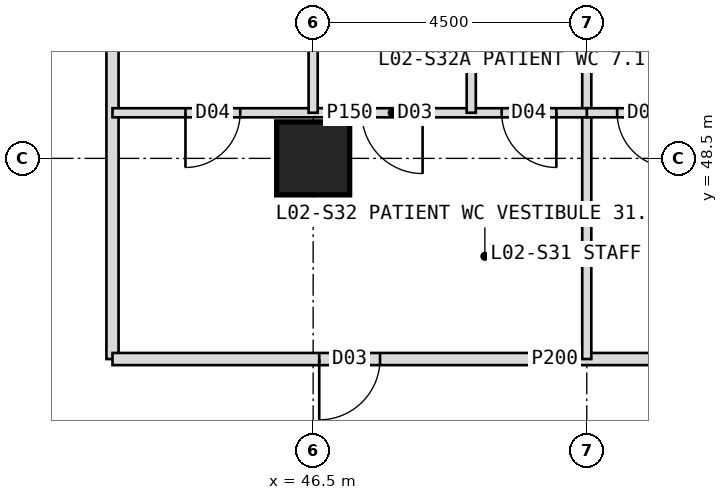
"""IFC4 building model, lengths in metres.
Left out: names, types, materials, properties, quantities, classifications, styles, units other than length and angle.
Written with IfcOpenShell. Run it as: python <this file> out.ifc"""

import sys

from ifc_helpers import new_model, si_unit, direction, frame, frame_2d, origin, origin_2d, place, context, subcontext, project, spatial, rectangle, hollow_rectangle, extrude, element, fill, save


model = new_model("IFC4")
c1 = context("Model", 3, precision=1e-05, world=origin(), true_north=direction((0.0, 1.0)))
c2 = subcontext(c1, "Body", "Model", "MODEL_VIEW")
j1 = project(units=[si_unit("LENGTHUNIT", "METRE"), si_unit("PLANEANGLEUNIT", "RADIAN")], contexts=[c1])
p1 = place(None, origin())
s1 = spatial("IfcSite", under=j1, at=p1, CompositionType="ELEMENT")
p2 = place(p1, origin())
s2 = spatial("IfcBuilding", under=s1, at=p2, CompositionType="ELEMENT")
p3 = place(p2, frame((0.0, 0.0, 11.0)))
s3 = spatial("IfcBuildingStorey", under=s2, at=p3, CompositionType="ELEMENT", Elevation=11.0)
p4 = place(p3, frame((46.5, 48.5, 0.0), z_axis=(0.0, 0.0, 1.0), x_axis=(1.0, 0.0, 0.0)))
e1 = element("IfcColumn", 1, at=p4, inside=s3, PredefinedType="COLUMN", context=c2, shape_type="SweptSolid", body=[
    extrude(hollow_rectangle(XDim=1.2, YDim=1.2, WallThickness=0.1, at=origin_2d()), origin(), (0.0, 0.0, 1.0), 5.5),
])
p5 = place(p3, frame((43.2, 45.2, 0.0), z_axis=(0.0, 0.0, 1.0), x_axis=(0.0, 1.0, 0.0)))
e2 = element("IfcWall", 2, at=p5, inside=s3, PredefinedType="PARTITIONING", context=c2, shape_type="SweptSolid", body=[
    extrude(rectangle(XDim=12.8, YDim=0.2, at=frame_2d((6.4, 0.0))), origin(), (0.0, 0.0, 1.0), 5.2),
])
p6 = place(p5, frame((9.8, 0.0, 0.0)))
e3 = element("IfcOpeningElement", 3, at=p6, cuts=e2, PredefinedType="OPENING", context=c2, shape_type="SweptSolid", body=[
    extrude(rectangle(XDim=1.0, YDim=2.1, at=frame_2d((0.5, 1.05))), frame((0.0, 0.11, 0.0), z_axis=(0.0, -1.0, 0.0), x_axis=(1.0, 0.0, 0.0)), (0.0, 0.0, 1.0), 0.22),
])
p7 = place(p3, frame((57.75, 45.2, 0.0), z_axis=(0.0, 0.0, 1.0), x_axis=(-1.0, 0.0, 0.0)))
e4 = element("IfcWall", 4, at=p7, inside=s3, PredefinedType="PARTITIONING", context=c2, shape_type="SweptSolid", body=[
    extrude(rectangle(XDim=14.55, YDim=0.2, at=frame_2d((7.275, 0.0))), origin(), (0.0, 0.0, 1.0), 5.2),
])
p8 = place(p7, frame((2.875, 0.0, 0.0)))
e5 = element("IfcOpeningElement", 5, at=p8, cuts=e4, PredefinedType="OPENING", context=c2, shape_type="SweptSolid", body=[
    extrude(rectangle(XDim=1.0, YDim=2.1, at=frame_2d((0.5, 1.05))), frame((0.0, 0.11, 0.0), z_axis=(0.0, -1.0, 0.0), x_axis=(1.0, 0.0, 0.0)), (0.0, 0.0, 1.0), 0.22),
])
p9 = place(p7, frame((10.15, 0.0, 0.0)))
e6 = element("IfcOpeningElement", 6, at=p9, cuts=e4, PredefinedType="OPENING", context=c2, shape_type="SweptSolid", body=[
    extrude(rectangle(XDim=1.0, YDim=2.1, at=frame_2d((0.5, 1.05))), frame((0.0, 0.11, 0.0), z_axis=(0.0, -1.0, 0.0), x_axis=(1.0, 0.0, 0.0)), (0.0, 0.0, 1.0), 0.22),
])
p10 = place(p3, frame((51.0, 53.0, 0.0), z_axis=(0.0, 0.0, 1.0), x_axis=(0.0, -1.0, 0.0)))
e7 = element("IfcWall", 7, at=p10, inside=s3, PredefinedType="PARTITIONING", context=c2, shape_type="SweptSolid", body=[
    extrude(rectangle(XDim=7.8, YDim=0.15, at=frame_2d((3.9, 0.0))), origin(), (0.0, 0.0, 1.0), 5.2),
])
p11 = place(p3, frame((57.75, 49.25, 0.0), z_axis=(0.0, 0.0, 1.0), x_axis=(-1.0, 0.0, 0.0)))
e8 = element("IfcWall", 8, at=p11, inside=s3, PredefinedType="PARTITIONING", context=c2, shape_type="SweptSolid", body=[
    extrude(rectangle(XDim=6.75, YDim=0.15, at=frame_2d((3.375, 0.0))), origin(), (0.0, 0.0, 1.0), 5.2),
])
p12 = place(p11, frame((0.675, 0.0, 0.0)))
e9 = element("IfcOpeningElement", 9, at=p12, cuts=e8, PredefinedType="OPENING", context=c2, shape_type="SweptSolid", body=[
    extrude(rectangle(XDim=0.9, YDim=2.1, at=frame_2d((0.45, 1.05))), frame((0.0, 0.085, 0.0), z_axis=(0.0, -1.0, 0.0), x_axis=(1.0, 0.0, 0.0)), (0.0, 0.0, 1.0), 0.17),
])
p13 = place(p11, frame((3.05, 0.0, 0.0)))
e10 = element("IfcOpeningElement", 10, at=p13, cuts=e8, PredefinedType="OPENING", context=c2, shape_type="SweptSolid", body=[
    extrude(rectangle(XDim=1.0, YDim=2.1, at=frame_2d((0.5, 1.05))), frame((0.0, 0.085, 0.0), z_axis=(0.0, -1.0, 0.0), x_axis=(1.0, 0.0, 0.0)), (0.0, 0.0, 1.0), 0.17),
])
p14 = place(p11, frame((5.35, 0.0, 0.0)))
e11 = element("IfcOpeningElement", 11, at=p14, cuts=e8, PredefinedType="OPENING", context=c2, shape_type="SweptSolid", body=[
    extrude(rectangle(XDim=0.9, YDim=2.1, at=frame_2d((0.45, 1.05))), frame((0.0, 0.085, 0.0), z_axis=(0.0, -1.0, 0.0), x_axis=(1.0, 0.0, 0.0)), (0.0, 0.0, 1.0), 0.17),
])
p15 = place(p3, frame((51.0, 49.25, 0.0), z_axis=(0.0, 0.0, 1.0), x_axis=(-1.0, 0.0, 0.0)))
e12 = element("IfcWall", 12, at=p15, inside=s3, PredefinedType="PARTITIONING", context=c2, shape_type="SweptSolid", body=[
    extrude(rectangle(XDim=7.8, YDim=0.15, at=frame_2d((3.9, 0.0))), origin(), (0.0, 0.0, 1.0), 5.2),
])
p16 = place(p15, frame((0.5, 0.0, 0.0)))
e13 = element("IfcOpeningElement", 13, at=p16, cuts=e12, PredefinedType="OPENING", context=c2, shape_type="SweptSolid", body=[
    extrude(rectangle(XDim=0.9, YDim=2.1, at=frame_2d((0.45, 1.05))), frame((0.0, 0.085, 0.0), z_axis=(0.0, -1.0, 0.0), x_axis=(1.0, 0.0, 0.0)), (0.0, 0.0, 1.0), 0.17),
])
p17 = place(p15, frame((2.7, 0.0, 0.0)))
e14 = element("IfcOpeningElement", 14, at=p17, cuts=e12, PredefinedType="OPENING", context=c2, shape_type="SweptSolid", body=[
    extrude(rectangle(XDim=1.0, YDim=2.1, at=frame_2d((0.5, 1.05))), frame((0.0, 0.085, 0.0), z_axis=(0.0, -1.0, 0.0), x_axis=(1.0, 0.0, 0.0)), (0.0, 0.0, 1.0), 0.17),
])
p18 = place(p15, frame((5.7, 0.0, 0.0)))
e15 = element("IfcOpeningElement", 15, at=p18, cuts=e12, PredefinedType="OPENING", context=c2, shape_type="SweptSolid", body=[
    extrude(rectangle(XDim=0.9, YDim=2.1, at=frame_2d((0.45, 1.05))), frame((0.0, 0.085, 0.0), z_axis=(0.0, -1.0, 0.0), x_axis=(1.0, 0.0, 0.0)), (0.0, 0.0, 1.0), 0.17),
])
p19 = place(p3, frame((49.1, 53.0, 0.0), z_axis=(0.0, 0.0, 1.0), x_axis=(0.0, -1.0, 0.0)))
e16 = element("IfcWall", 16, at=p19, inside=s3, PredefinedType="PARTITIONING", context=c2, shape_type="SweptSolid", body=[
    extrude(rectangle(XDim=3.75, YDim=0.15, at=frame_2d((1.875, 0.0))), origin(), (0.0, 0.0, 1.0), 5.2),
])
p20 = place(p3, frame((46.5, 53.0, 0.0), z_axis=(0.0, 0.0, 1.0), x_axis=(0.0, -1.0, 0.0)))
e17 = element("IfcWall", 17, at=p20, inside=s3, PredefinedType="PARTITIONING", context=c2, shape_type="SweptSolid", body=[
    extrude(rectangle(XDim=3.75, YDim=0.15, at=frame_2d((1.875, 0.0))), origin(), (0.0, 0.0, 1.0), 4.4),
])
p21 = place(p9, origin())
e18 = element("IfcDoor", 18, at=p21, inside=s3, OperationType="SINGLE_SWING_RIGHT", PredefinedType="DOOR", context=c2, shape_type="SweptSolid", body=[
    extrude(rectangle(XDim=1.0, YDim=2.1, at=frame_2d((0.5, 1.05))), frame((0.0, 0.025, 0.0), z_axis=(0.0, -1.0, 0.0), x_axis=(1.0, 0.0, 0.0)), (0.0, 0.0, 1.0), 0.05),
])
fill(e6, e18)
p22 = place(p14, origin())
e19 = element("IfcDoor", 19, at=p22, inside=s3, OperationType="SINGLE_SWING_LEFT", PredefinedType="DOOR", context=c2, shape_type="SweptSolid", body=[
    extrude(rectangle(XDim=0.9, YDim=2.1, at=frame_2d((0.45, 1.05))), frame((0.0, 0.025, 0.0), z_axis=(0.0, -1.0, 0.0), x_axis=(1.0, 0.0, 0.0)), (0.0, 0.0, 1.0), 0.05),
])
fill(e11, e19)
p23 = place(p16, origin())
e20 = element("IfcDoor", 20, at=p23, inside=s3, OperationType="SINGLE_SWING_LEFT", PredefinedType="DOOR", context=c2, shape_type="SweptSolid", body=[
    extrude(rectangle(XDim=0.9, YDim=2.1, at=frame_2d((0.45, 1.05))), frame((0.0, 0.025, 0.0), z_axis=(0.0, -1.0, 0.0), x_axis=(1.0, 0.0, 0.0)), (0.0, 0.0, 1.0), 0.05),
])
fill(e13, e20)
p24 = place(p17, origin())
e21 = element("IfcDoor", 21, at=p24, inside=s3, OperationType="SINGLE_SWING_LEFT", PredefinedType="DOOR", context=c2, shape_type="SweptSolid", body=[
    extrude(rectangle(XDim=1.0, YDim=2.1, at=frame_2d((0.5, 1.05))), frame((0.0, 0.025, 0.0), z_axis=(0.0, -1.0, 0.0), x_axis=(1.0, 0.0, 0.0)), (0.0, 0.0, 1.0), 0.05),
])
fill(e14, e21)
p25 = place(p18, origin())
e22 = element("IfcDoor", 22, at=p25, inside=s3, OperationType="SINGLE_SWING_RIGHT", PredefinedType="DOOR", context=c2, shape_type="SweptSolid", body=[
    extrude(rectangle(XDim=0.9, YDim=2.1, at=frame_2d((0.45, 1.05))), frame((0.0, 0.025, 0.0), z_axis=(0.0, -1.0, 0.0), x_axis=(1.0, 0.0, 0.0)), (0.0, 0.0, 1.0), 0.05),
])
fill(e15, e22)
save(model, sys.argv[1])
